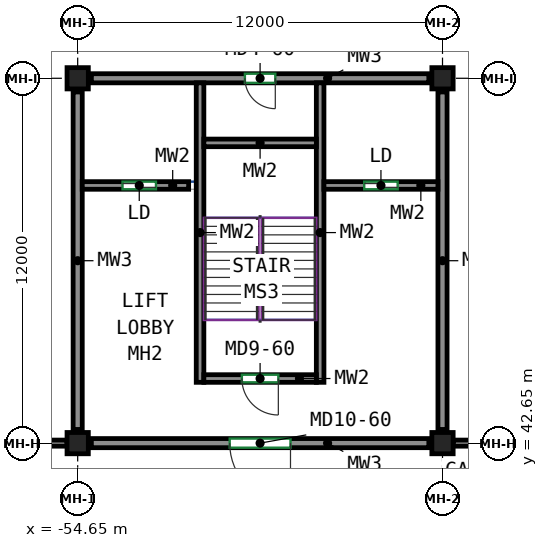
"""IFC4 building model, lengths in metres.
Left out: names, types, materials, properties, quantities, classifications, styles, units other than length and angle.
Written with IfcOpenShell. Run it as: python <this file> out.ifc"""

import sys

from ifc_helpers import new_model, si_unit, direction, frame, frame_2d, origin, origin_2d, place, context, subcontext, project, spatial, rectangle, extrude, source, transform, mapped, element, fill, save


model = new_model("IFC4")
c1 = context("Model", 3, precision=1e-05, world=origin(), true_north=direction((0.0, 1.0)))
c2 = subcontext(c1, "Body", "Model", "MODEL_VIEW")
j1 = project(units=[si_unit("LENGTHUNIT", "METRE"), si_unit("PLANEANGLEUNIT", "RADIAN")], contexts=[c1])
p1 = place(None, origin())
s1 = spatial("IfcSite", under=j1, at=p1, CompositionType="ELEMENT")
p2 = place(p1, origin())
s2 = spatial("IfcBuilding", under=s1, at=p2, CompositionType="ELEMENT")
p3 = place(p2, frame((0.0, 0.0, 18.0)))
s3 = spatial("IfcBuildingStorey", under=s2, at=p3, CompositionType="ELEMENT", Elevation=18.0)
m1 = source(origin(), c2, "Body", "SweptSolid", [
    extrude(rectangle(XDim=0.7, YDim=0.7, at=origin_2d()), origin(), (0.0, 0.0, 1.0), 4.1),
])
for number, where, z_axis, x_axis in (
    (1, (-54.65, 42.65, 0.0), (0.0, 0.0, 1.0), (1.0, 0.0, 0.0)),
    (2, (-54.65, 54.65, 0.0), (0.0, 0.0, 1.0), (1.0, 0.0, 0.0)),
    (3, (-42.65, 42.65, 0.0), (0.0, 0.0, 1.0), (1.0, 0.0, 0.0)),
    (4, (-42.65, 54.65, 0.0), (0.0, 0.0, 1.0), (1.0, 0.0, 0.0)),
):
    element("IfcColumn", number, at=place(p3, frame(where, z_axis=z_axis, x_axis=x_axis)), inside=s3, PredefinedType="COLUMN", context=c2, shape_type="MappedRepresentation", body=[
        mapped(m1, transform((0.0, 0.0, 0.0))),
    ])
m2 = source(origin(), c2, "Body", "SweptSolid", [
    extrude(rectangle(XDim=11.1, YDim=0.3, at=frame_2d((5.55, 0.0))), origin(), (0.0, 0.0, 1.0), 3.3),
])
p4 = place(p3, frame((-43.1, 54.65, 0.0), z_axis=(0.0, 0.0, 1.0), x_axis=(-1.0, 0.0, 0.0)))
e5 = element("IfcWall", 5, at=p4, inside=s3, PredefinedType="SHEAR", context=c2, shape_type="MappedRepresentation", body=[
    mapped(m2, transform((0.0, 0.0, 0.0))),
])
p5 = place(p4, frame((5.05, 0.0, 0.0)))
e6 = element("IfcOpeningElement", 6, at=p5, cuts=e5, PredefinedType="OPENING", context=c2, shape_type="SweptSolid", body=[
    extrude(rectangle(XDim=1.0, YDim=2.1, at=frame_2d((0.5, 1.05))), frame((0.0, 0.16, 0.0), z_axis=(0.0, -1.0, 0.0), x_axis=(1.0, 0.0, 0.0)), (0.0, 0.0, 1.0), 0.32),
])
p6 = place(p3, frame((-43.1, 42.65, 0.0), z_axis=(0.0, 0.0, 1.0), x_axis=(-1.0, 0.0, 0.0)))
e7 = element("IfcWall", 7, at=p6, inside=s3, PredefinedType="SHEAR", context=c2, shape_type="MappedRepresentation", body=[
    mapped(m2, transform((0.0, 0.0, 0.0))),
])
p7 = place(p6, frame((4.55, 0.0, 0.0)))
e8 = element("IfcOpeningElement", 8, at=p7, cuts=e7, PredefinedType="OPENING", context=c2, shape_type="SweptSolid", body=[
    extrude(rectangle(XDim=2.0, YDim=2.4, at=frame_2d((1.0, 1.2))), frame((0.0, 0.16, 0.0), z_axis=(0.0, -1.0, 0.0), x_axis=(1.0, 0.0, 0.0)), (0.0, 0.0, 1.0), 0.32),
])
for number, where, z_axis, x_axis in (
    (9, (-42.65, 54.2, 0.0), (0.0, 0.0, 1.0), (0.0, -1.0, 0.0)),
    (10, (-54.65, 54.2, 0.0), (0.0, 0.0, 1.0), (0.0, -1.0, 0.0)),
):
    element("IfcWall", number, at=place(p3, frame(where, z_axis=z_axis, x_axis=x_axis)), inside=s3, PredefinedType="SHEAR", context=c2, shape_type="MappedRepresentation", body=[
        mapped(m2, transform((0.0, 0.0, 0.0))),
    ])
m3 = source(origin(), c2, "Body", "SweptSolid", [
    extrude(rectangle(XDim=9.85, YDim=0.25, at=frame_2d((4.925, 0.0))), origin(), (0.0, 0.0, 1.0), 4.1),
])
for number, where, z_axis, x_axis in (
    (11, (-46.675, 54.5, 0.0), (0.0, 0.0, 1.0), (0.0, -1.0, 0.0)),
    (12, (-50.625, 54.5, 0.0), (0.0, 0.0, 1.0), (0.0, -1.0, 0.0)),
):
    element("IfcWall", number, at=place(p3, frame(where, z_axis=z_axis, x_axis=x_axis)), inside=s3, PredefinedType="SHEAR", context=c2, shape_type="MappedRepresentation", body=[
        mapped(m3, transform((0.0, 0.0, 0.0))),
    ])
m4 = source(origin(), c2, "Body", "SweptSolid", [
    extrude(rectangle(XDim=3.7, YDim=0.25, at=frame_2d((1.85, 0.0))), origin(), (0.0, 0.0, 1.0), 4.1),
])
p8 = place(p3, frame((-46.8, 52.525, 0.0), z_axis=(0.0, 0.0, 1.0), x_axis=(-1.0, 0.0, 0.0)))
e13 = element("IfcWall", 13, at=p8, inside=s3, PredefinedType="SHEAR", context=c2, shape_type="MappedRepresentation", body=[
    mapped(m4, transform((0.0, 0.0, 0.0))),
])
p9 = place(p3, frame((-46.8, 44.775, 0.0), z_axis=(0.0, 0.0, 1.0), x_axis=(-1.0, 0.0, 0.0)))
e14 = element("IfcWall", 14, at=p9, inside=s3, PredefinedType="SHEAR", context=c2, shape_type="MappedRepresentation", body=[
    mapped(m4, transform((0.0, 0.0, 0.0))),
])
p10 = place(p9, frame((1.25, 0.0, 0.0)))
e15 = element("IfcOpeningElement", 15, at=p10, cuts=e14, PredefinedType="OPENING", context=c2, shape_type="SweptSolid", body=[
    extrude(rectangle(XDim=1.2, YDim=2.1, at=frame_2d((0.6, 1.05))), frame((0.0, 0.135, 0.0), z_axis=(0.0, -1.0, 0.0), x_axis=(1.0, 0.0, 0.0)), (0.0, 0.0, 1.0), 0.27),
])
m5 = source(origin(), c2, "Body", "SweptSolid", [
    extrude(rectangle(XDim=3.75, YDim=0.25, at=frame_2d((1.875, 0.0))), origin(), (0.0, 0.0, 1.0), 4.1),
])
p11 = place(p3, frame((-42.8, 51.125, 0.0), z_axis=(0.0, 0.0, 1.0), x_axis=(-1.0, 0.0, 0.0)))
e16 = element("IfcWall", 16, at=p11, inside=s3, PredefinedType="SHEAR", context=c2, shape_type="MappedRepresentation", body=[
    mapped(m5, transform((0.0, 0.0, 0.0))),
])
p12 = place(p11, frame((1.325, 0.0, 0.0)))
e17 = element("IfcOpeningElement", 17, at=p12, cuts=e16, PredefinedType="OPENING", context=c2, shape_type="SweptSolid", body=[
    extrude(rectangle(XDim=1.1, YDim=2.1, at=frame_2d((0.55, 1.05))), frame((0.0, 0.135, 0.0), z_axis=(0.0, -1.0, 0.0), x_axis=(1.0, 0.0, 0.0)), (0.0, 0.0, 1.0), 0.27),
])
m6 = source(origin(), c2, "Body", "SweptSolid", [
    extrude(rectangle(XDim=3.5, YDim=0.25, at=frame_2d((1.75, 0.0))), origin(), (0.0, 0.0, 1.0), 4.1),
])
p13 = place(p3, frame((-51.0, 51.125, 0.0), z_axis=(0.0, 0.0, 1.0), x_axis=(-1.0, 0.0, 0.0)))
e18 = element("IfcWall", 18, at=p13, inside=s3, PredefinedType="SHEAR", context=c2, shape_type="MappedRepresentation", body=[
    mapped(m6, transform((0.0, 0.0, 0.0))),
])
p14 = place(p13, frame((1.075, 0.0, 0.0)))
e19 = element("IfcOpeningElement", 19, at=p14, cuts=e18, PredefinedType="OPENING", context=c2, shape_type="SweptSolid", body=[
    extrude(rectangle(XDim=1.1, YDim=2.1, at=frame_2d((0.55, 1.05))), frame((0.0, 0.135, 0.0), z_axis=(0.0, -1.0, 0.0), x_axis=(1.0, 0.0, 0.0)), (0.0, 0.0, 1.0), 0.27),
])
m7 = source(origin(), c2, "Body", "SweptSolid", [
    extrude(rectangle(XDim=1.85, YDim=0.2, at=frame_2d((0.925, 0.0))), origin(), (0.0, 0.0, 1.0), 4.1),
])
p15 = place(p3, frame((-56.85, 42.65, 0.0), z_axis=(0.0, 0.0, 1.0), x_axis=(1.0, 0.0, 0.0)))
e20 = element("IfcWall", 20, at=p15, inside=s3, PredefinedType="PARTITIONING", context=c2, shape_type="MappedRepresentation", body=[
    mapped(m7, transform((0.0, 0.0, 0.0))),
])
m8 = source(origin(), c2, "Body", "SweptSolid", [
    extrude(rectangle(XDim=11.3, YDim=0.2, at=frame_2d((5.65, 0.0))), origin(), (0.0, 0.0, 1.0), 3.3),
])
p16 = place(p3, frame((-42.3, 42.65, 0.0), z_axis=(0.0, 0.0, 1.0), x_axis=(1.0, 0.0, 0.0)))
e21 = element("IfcWall", 21, at=p16, inside=s3, PredefinedType="PARTITIONING", context=c2, shape_type="MappedRepresentation", body=[
    mapped(m8, transform((0.0, 0.0, 0.0))),
])
p17 = place(p16, frame((4.45, 0.0, 0.0)))
e22 = element("IfcOpeningElement", 22, at=p17, cuts=e21, PredefinedType="OPENING", context=c2, shape_type="SweptSolid", body=[
    extrude(rectangle(XDim=2.4, YDim=2.4, at=frame_2d((1.2, 1.2))), frame((0.0, 0.11, 0.0), z_axis=(0.0, -1.0, 0.0), x_axis=(1.0, 0.0, 0.0)), (0.0, 0.0, 1.0), 0.22),
])
p18 = place(p10, origin())
e23 = element("IfcDoor", 23, at=p18, inside=s3, OperationType="DOUBLE_DOOR_SINGLE_SWING", PredefinedType="DOOR", context=c2, shape_type="SweptSolid", body=[
    extrude(rectangle(XDim=1.2, YDim=2.1, at=frame_2d((0.6, 1.05))), frame((0.0, 0.025, 0.0), z_axis=(0.0, -1.0, 0.0), x_axis=(1.0, 0.0, 0.0)), (0.0, 0.0, 1.0), 0.05),
])
fill(e15, e23)
p19 = place(p7, origin())
e24 = element("IfcDoor", 24, at=p19, inside=s3, OperationType="DOUBLE_DOOR_SINGLE_SWING", PredefinedType="DOOR", context=c2, shape_type="SweptSolid", body=[
    extrude(rectangle(XDim=2.0, YDim=2.4, at=frame_2d((1.0, 1.2))), frame((0.0, 0.025, 0.0), z_axis=(0.0, -1.0, 0.0), x_axis=(1.0, 0.0, 0.0)), (0.0, 0.0, 1.0), 0.05),
])
fill(e8, e24)
p20 = place(p12, origin())
e25 = element("IfcDoor", 25, at=p20, inside=s3, OperationType="SLIDING_TO_LEFT", PredefinedType="DOOR", context=c2, shape_type="SweptSolid", body=[
    extrude(rectangle(XDim=1.1, YDim=2.1, at=frame_2d((0.55, 1.05))), frame((0.0, 0.025, 0.0), z_axis=(0.0, -1.0, 0.0), x_axis=(1.0, 0.0, 0.0)), (0.0, 0.0, 1.0), 0.05),
])
fill(e17, e25)
p21 = place(p14, origin())
e26 = element("IfcDoor", 26, at=p21, inside=s3, OperationType="SLIDING_TO_LEFT", PredefinedType="DOOR", context=c2, shape_type="SweptSolid", body=[
    extrude(rectangle(XDim=1.1, YDim=2.1, at=frame_2d((0.55, 1.05))), frame((0.0, 0.025, 0.0), z_axis=(0.0, -1.0, 0.0), x_axis=(1.0, 0.0, 0.0)), (0.0, 0.0, 1.0), 0.05),
])
fill(e19, e26)
p22 = place(p5, origin())
e27 = element("IfcDoor", 27, at=p22, inside=s3, OperationType="SINGLE_SWING_LEFT", PredefinedType="DOOR", context=c2, shape_type="SweptSolid", body=[
    extrude(rectangle(XDim=1.0, YDim=2.1, at=frame_2d((0.5, 1.05))), frame((0.0, 0.025, 0.0), z_axis=(0.0, -1.0, 0.0), x_axis=(1.0, 0.0, 0.0)), (0.0, 0.0, 1.0), 0.05),
])
fill(e6, e27)
save(model, sys.argv[1])
